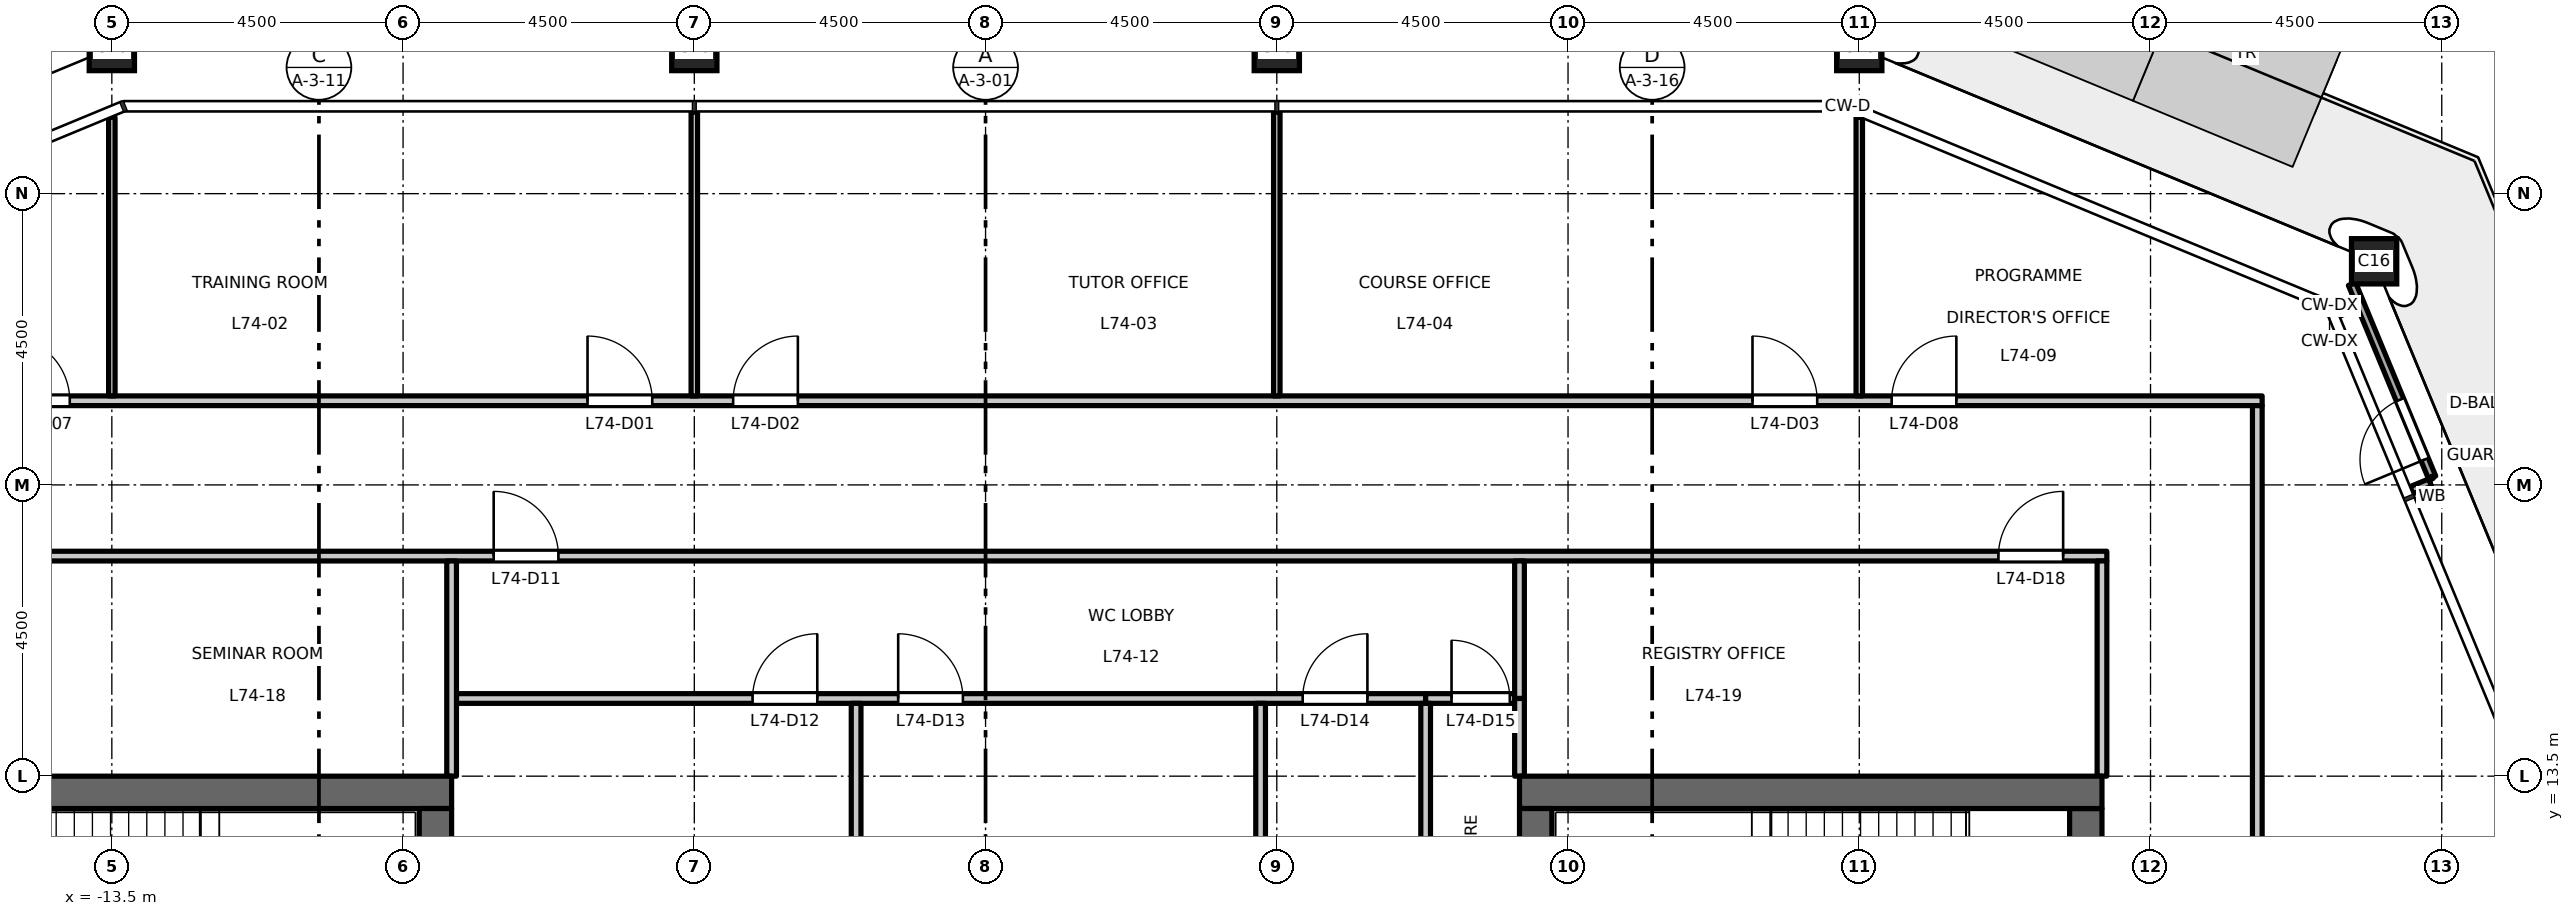
"""IFC4 building model, lengths in metres.
Left out: names, types, materials, properties, quantities, classifications, styles, units other than length and angle.
Written with IfcOpenShell. Run it as: python <this file> out.ifc"""

import sys

from ifc_helpers import new_model, si_unit, direction, frame, frame_2d, origin, origin_2d, place, context, subcontext, project, spatial, rectangle, hollow_rectangle, extrude, element, fill, save


model = new_model("IFC4")
c1 = context("Model", 3, precision=1e-05, world=origin(), true_north=direction((0.0, 1.0)))
c2 = subcontext(c1, "Body", "Model", "MODEL_VIEW")
j1 = project(units=[si_unit("LENGTHUNIT", "METRE"), si_unit("PLANEANGLEUNIT", "RADIAN")], contexts=[c1])
p1 = place(None, origin())
s1 = spatial("IfcSite", under=j1, at=p1, CompositionType="ELEMENT")
p2 = place(p1, origin())
s2 = spatial("IfcBuilding", under=s1, at=p2, CompositionType="ELEMENT")
p3 = place(p2, frame((0.0, 0.0, 343.7)))
s3 = spatial("IfcBuildingStorey", under=s2, at=p3, CompositionType="ELEMENT", Elevation=343.7)
for number, where, z_axis, x_axis in (
    (1, (21.455, 21.455, 0.0), (0.0, 0.0, 1.0), (1.0, 0.0, 0.0)),
    (2, (13.5, 24.75, 0.0), (0.0, 0.0, 1.0), (1.0, 0.0, 0.0)),
    (3, (4.5, 24.75, 0.0), (0.0, 0.0, 1.0), (1.0, 0.0, 0.0)),
    (4, (-4.5, 24.75, 0.0), (0.0, 0.0, 1.0), (1.0, 0.0, 0.0)),
    (5, (-13.5, 24.75, 0.0), (0.0, 0.0, 1.0), (1.0, 0.0, 0.0)),
):
    element("IfcColumn", number, at=place(p3, frame(where, z_axis=z_axis, x_axis=x_axis)), inside=s3, PredefinedType="COLUMN", context=c2, shape_type="SweptSolid", body=[
        extrude(hollow_rectangle(XDim=0.7, YDim=0.7, WallThickness=0.036, at=origin_2d()), origin(), (0.0, 0.0, 1.0), 4.5),
    ])
p4 = place(p3, frame((-8.25, 13.25, 0.0), z_axis=(0.0, 0.0, 1.0), x_axis=(-1.0, 0.0, 0.0)))
e6 = element("IfcWall", 6, at=p4, inside=s3, PredefinedType="SHEAR", context=c2, shape_type="SweptSolid", body=[
    extrude(rectangle(XDim=9.0, YDim=0.5, at=frame_2d((4.5, 0.0))), origin(), (0.0, 0.0, 1.0), 4.3),
])
p5 = place(p3, frame((-8.5, -13.0, 0.0), z_axis=(0.0, 0.0, 1.0), x_axis=(0.0, 1.0, 0.0)))
e7 = element("IfcWall", 7, at=p5, inside=s3, PredefinedType="SHEAR", context=c2, shape_type="SweptSolid", body=[
    extrude(rectangle(XDim=26.0, YDim=0.5, at=frame_2d((13.0, 0.0))), origin(), (0.0, 0.0, 1.0), 4.3),
])
p6 = place(p3, frame((17.0, -13.0, 0.0), z_axis=(0.0, 0.0, 1.0), x_axis=(0.0, 1.0, 0.0)))
e8 = element("IfcWall", 8, at=p6, inside=s3, PredefinedType="SHEAR", context=c2, shape_type="SweptSolid", body=[
    extrude(rectangle(XDim=26.0, YDim=0.5, at=frame_2d((13.0, 0.0))), origin(), (0.0, 0.0, 1.0), 4.3),
])
p7 = place(p6, frame((16.825, 0.0, 0.0)))
e9 = element("IfcOpeningElement", 9, at=p7, cuts=e8, PredefinedType="OPENING", context=c2, shape_type="SweptSolid", body=[
    extrude(rectangle(XDim=1.8, YDim=2.1, at=frame_2d((0.9, 1.05))), frame((0.0, 0.26, 0.0), z_axis=(0.0, -1.0, 0.0), x_axis=(1.0, 0.0, 0.0)), (0.0, 0.0, 1.0), 0.52),
])
p8 = place(p6, frame((7.375, 0.0, 0.0)))
e10 = element("IfcOpeningElement", 10, at=p8, cuts=e8, PredefinedType="OPENING", context=c2, shape_type="SweptSolid", body=[
    extrude(rectangle(XDim=1.8, YDim=2.1, at=frame_2d((0.9, 1.05))), frame((0.0, 0.26, 0.0), z_axis=(0.0, -1.0, 0.0), x_axis=(1.0, 0.0, 0.0)), (0.0, 0.0, 1.0), 0.52),
])
p9 = place(p3, frame((8.25, 13.25, 0.0), z_axis=(0.0, 0.0, 1.0), x_axis=(1.0, 0.0, 0.0)))
e11 = element("IfcWall", 11, at=p9, inside=s3, PredefinedType="SHEAR", context=c2, shape_type="SweptSolid", body=[
    extrude(rectangle(XDim=9.0, YDim=0.5, at=frame_2d((4.5, 0.0))), origin(), (0.0, 0.0, 1.0), 4.3),
])
p10 = place(p3, frame((8.5, -13.0, 0.0), z_axis=(0.0, 0.0, 1.0), x_axis=(0.0, 1.0, 0.0)))
e12 = element("IfcWall", 12, at=p10, inside=s3, PredefinedType="SHEAR", context=c2, shape_type="SweptSolid", body=[
    extrude(rectangle(XDim=26.0, YDim=0.5, at=frame_2d((13.0, 0.0))), origin(), (0.0, 0.0, 1.0), 4.3),
])
p11 = place(p3, frame((22.033, 17.917, 0.0), z_axis=(0.0, 0.0, 1.0), x_axis=(0.923844027884, 0.382769136873, 0.0)))
e13 = element("IfcWall", 13, at=p11, inside=s3, PredefinedType="STANDARD", context=c2, shape_type="SweptSolid", body=[
    extrude(rectangle(XDim=0.31, YDim=0.12, at=frame_2d((0.155, 0.0))), origin(), (0.0, 0.0, 1.0), 4.3),
])
p12 = place(p3, frame((20.896, 20.66, 0.0), z_axis=(0.0, 0.0, 1.0), x_axis=(0.923959293734, 0.382490814953, 0.0)))
e14 = element("IfcWall", 14, at=p12, inside=s3, PredefinedType="STANDARD", context=c2, shape_type="SweptSolid", body=[
    extrude(rectangle(XDim=0.31, YDim=0.12, at=frame_2d((0.155, 0.0))), origin(), (0.0, 0.0, 1.0), 4.3),
])
p13 = place(p3, frame((22.352, 18.115, 0.0), z_axis=(0.0, 0.0, 1.0), x_axis=(-0.382702621907, 0.923871583709, 0.0)))
e15 = element("IfcWall", 15, at=p13, inside=s3, PredefinedType="STANDARD", context=c2, shape_type="SweptSolid", body=[
    extrude(rectangle(XDim=3.237, YDim=0.12, at=frame_2d((1.618, 0.0))), origin(), (0.0, 0.0, 1.0), 4.3),
])
p14 = place(p13, frame((0.3, 0.0, 0.0)))
e16 = element("IfcOpeningElement", 16, at=p14, cuts=e15, PredefinedType="OPENING", context=c2, shape_type="SweptSolid", body=[
    extrude(rectangle(XDim=1.0, YDim=2.4, at=frame_2d((0.5, 1.2))), frame((0.0, 0.07, 0.0), z_axis=(0.0, -1.0, 0.0), x_axis=(1.0, 0.0, 0.0)), (0.0, 0.0, 1.0), 0.14),
])
p15 = place(p3, frame((-8.175, 14.7, 0.0), z_axis=(0.0, 0.0, 1.0), x_axis=(1.0, 0.0, 0.0)))
e17 = element("IfcWall", 17, at=p15, inside=s3, PredefinedType="PARTITIONING", context=c2, shape_type="SweptSolid", body=[
    extrude(rectangle(XDim=14.975, YDim=0.15, at=frame_2d((7.488, 0.0))), origin(), (0.0, 0.0, 1.0), 4.3),
])
p16 = place(p15, frame((4.575, 0.0, 0.0)))
e18 = element("IfcOpeningElement", 18, at=p16, cuts=e17, PredefinedType="OPENING", context=c2, shape_type="SweptSolid", body=[
    extrude(rectangle(XDim=1.0, YDim=2.1, at=frame_2d((0.5, 1.05))), frame((0.0, 0.085, 0.0), z_axis=(0.0, -1.0, 0.0), x_axis=(1.0, 0.0, 0.0)), (0.0, 0.0, 1.0), 0.17),
])
p17 = place(p15, frame((6.825, 0.0, 0.0)))
e19 = element("IfcOpeningElement", 19, at=p17, cuts=e17, PredefinedType="OPENING", context=c2, shape_type="SweptSolid", body=[
    extrude(rectangle(XDim=1.0, YDim=2.1, at=frame_2d((0.5, 1.05))), frame((0.0, 0.085, 0.0), z_axis=(0.0, -1.0, 0.0), x_axis=(1.0, 0.0, 0.0)), (0.0, 0.0, 1.0), 0.17),
])
p18 = place(p15, frame((13.075, 0.0, 0.0)))
e20 = element("IfcOpeningElement", 20, at=p18, cuts=e17, PredefinedType="OPENING", context=c2, shape_type="SweptSolid", body=[
    extrude(rectangle(XDim=1.0, YDim=2.1, at=frame_2d((0.5, 1.05))), frame((0.0, 0.085, 0.0), z_axis=(0.0, -1.0, 0.0), x_axis=(1.0, 0.0, 0.0)), (0.0, 0.0, 1.0), 0.17),
])
p19 = place(p3, frame((6.8, 14.7, 0.0), z_axis=(0.0, 0.0, 1.0), x_axis=(1.0, 0.0, 0.0)))
e21 = element("IfcWall", 21, at=p19, inside=s3, PredefinedType="PARTITIONING", context=c2, shape_type="SweptSolid", body=[
    extrude(rectangle(XDim=1.375, YDim=0.15, at=frame_2d((0.688, 0.0))), origin(), (0.0, 0.0, 1.0), 4.3),
])
p20 = place(p19, frame((0.4, 0.0, 0.0)))
e22 = element("IfcOpeningElement", 22, at=p20, cuts=e21, PredefinedType="OPENING", context=c2, shape_type="SweptSolid", body=[
    extrude(rectangle(XDim=0.9, YDim=2.1, at=frame_2d((0.45, 1.05))), frame((0.0, 0.085, 0.0), z_axis=(0.0, -1.0, 0.0), x_axis=(1.0, 0.0, 0.0)), (0.0, 0.0, 1.0), 0.17),
])
p21 = place(p3, frame((-17.325, 16.9, 0.0), z_axis=(0.0, 0.0, 1.0), x_axis=(1.0, 0.0, 0.0)))
e23 = element("IfcWall", 23, at=p21, inside=s3, PredefinedType="PARTITIONING", context=c2, shape_type="SweptSolid", body=[
    extrude(rectangle(XDim=34.65, YDim=0.15, at=frame_2d((17.325, 0.0))), origin(), (0.0, 0.0, 1.0), 4.3),
])
p22 = place(p21, frame((9.725, 0.0, 0.0)))
e24 = element("IfcOpeningElement", 24, at=p22, cuts=e23, PredefinedType="OPENING", context=c2, shape_type="SweptSolid", body=[
    extrude(rectangle(XDim=1.0, YDim=2.1, at=frame_2d((0.5, 1.05))), frame((0.0, 0.085, 0.0), z_axis=(0.0, -1.0, 0.0), x_axis=(1.0, 0.0, 0.0)), (0.0, 0.0, 1.0), 0.17),
])
p23 = place(p21, frame((0.725, 0.0, 0.0)))
e25 = element("IfcOpeningElement", 25, at=p23, cuts=e23, PredefinedType="OPENING", context=c2, shape_type="SweptSolid", body=[
    extrude(rectangle(XDim=1.0, YDim=2.1, at=frame_2d((0.5, 1.05))), frame((0.0, 0.085, 0.0), z_axis=(0.0, -1.0, 0.0), x_axis=(1.0, 0.0, 0.0)), (0.0, 0.0, 1.0), 0.17),
])
p24 = place(p21, frame((32.975, 0.0, 0.0)))
e26 = element("IfcOpeningElement", 26, at=p24, cuts=e23, PredefinedType="OPENING", context=c2, shape_type="SweptSolid", body=[
    extrude(rectangle(XDim=1.0, YDim=2.1, at=frame_2d((0.5, 1.05))), frame((0.0, 0.085, 0.0), z_axis=(0.0, -1.0, 0.0), x_axis=(1.0, 0.0, 0.0)), (0.0, 0.0, 1.0), 0.17),
])
p25 = place(p3, frame((-21.276, 19.3, 0.0), z_axis=(0.0, 0.0, 1.0), x_axis=(1.0, 0.0, 0.0)))
e27 = element("IfcWall", 27, at=p25, inside=s3, PredefinedType="PARTITIONING", context=c2, shape_type="SweptSolid", body=[
    extrude(rectangle(XDim=41.001, YDim=0.15, at=frame_2d((20.5, 0.0))), origin(), (0.0, 0.0, 1.0), 4.3),
])
p26 = place(p25, frame((15.126, 0.0, 0.0)))
e28 = element("IfcOpeningElement", 28, at=p26, cuts=e27, PredefinedType="OPENING", context=c2, shape_type="SweptSolid", body=[
    extrude(rectangle(XDim=1.0, YDim=2.1, at=frame_2d((0.5, 1.05))), frame((0.0, 0.085, 0.0), z_axis=(0.0, -1.0, 0.0), x_axis=(1.0, 0.0, 0.0)), (0.0, 0.0, 1.0), 0.17),
])
p27 = place(p25, frame((17.376, 0.0, 0.0)))
e29 = element("IfcOpeningElement", 29, at=p27, cuts=e27, PredefinedType="OPENING", context=c2, shape_type="SweptSolid", body=[
    extrude(rectangle(XDim=1.0, YDim=2.1, at=frame_2d((0.5, 1.05))), frame((0.0, 0.085, 0.0), z_axis=(0.0, -1.0, 0.0), x_axis=(1.0, 0.0, 0.0)), (0.0, 0.0, 1.0), 0.17),
])
p28 = place(p25, frame((33.126, 0.0, 0.0)))
e30 = element("IfcOpeningElement", 30, at=p28, cuts=e27, PredefinedType="OPENING", context=c2, shape_type="SweptSolid", body=[
    extrude(rectangle(XDim=1.0, YDim=2.1, at=frame_2d((0.5, 1.05))), frame((0.0, 0.085, 0.0), z_axis=(0.0, -1.0, 0.0), x_axis=(1.0, 0.0, 0.0)), (0.0, 0.0, 1.0), 0.17),
])
p29 = place(p25, frame((6.126, 0.0, 0.0)))
e31 = element("IfcOpeningElement", 31, at=p29, cuts=e27, PredefinedType="OPENING", context=c2, shape_type="SweptSolid", body=[
    extrude(rectangle(XDim=1.0, YDim=2.1, at=frame_2d((0.5, 1.05))), frame((0.0, 0.085, 0.0), z_axis=(0.0, -1.0, 0.0), x_axis=(1.0, 0.0, 0.0)), (0.0, 0.0, 1.0), 0.17),
])
p30 = place(p25, frame((35.276, 0.0, 0.0)))
e32 = element("IfcOpeningElement", 32, at=p30, cuts=e27, PredefinedType="OPENING", context=c2, shape_type="SweptSolid", body=[
    extrude(rectangle(XDim=1.0, YDim=2.1, at=frame_2d((0.5, 1.05))), frame((0.0, 0.085, 0.0), z_axis=(0.0, -1.0, 0.0), x_axis=(1.0, 0.0, 0.0)), (0.0, 0.0, 1.0), 0.17),
])
p31 = place(p3, frame((-13.5, 19.375, 0.0), z_axis=(0.0, 0.0, 1.0), x_axis=(0.0, 1.0, 0.0)))
e33 = element("IfcWall", 33, at=p31, inside=s3, PredefinedType="PARTITIONING", context=c2, shape_type="SweptSolid", body=[
    extrude(rectangle(XDim=4.303, YDim=0.1, at=frame_2d((2.151, 0.0))), origin(), (0.0, 0.0, 1.0), 3.7),
])
p32 = place(p3, frame((-8.25, 13.5, 0.0), z_axis=(0.0, 0.0, 1.0), x_axis=(0.0, 1.0, 0.0)))
e34 = element("IfcWall", 34, at=p32, inside=s3, PredefinedType="PARTITIONING", context=c2, shape_type="SweptSolid", body=[
    extrude(rectangle(XDim=3.325, YDim=0.15, at=frame_2d((1.663, 0.0))), origin(), (0.0, 0.0, 1.0), 4.3),
])
p33 = place(p3, frame((-4.5, 19.375, 0.0), z_axis=(0.0, 0.0, 1.0), x_axis=(0.0, 1.0, 0.0)))
e35 = element("IfcWall", 35, at=p33, inside=s3, PredefinedType="PARTITIONING", context=c2, shape_type="SweptSolid", body=[
    extrude(rectangle(XDim=4.385, YDim=0.1, at=frame_2d((2.192, 0.0))), origin(), (0.0, 0.0, 1.0), 3.6),
])
for number, where, z_axis, x_axis in (
    (36, (-2.0, 8.37, 0.0), (0.0, 0.0, 1.0), (0.0, 1.0, 0.0)),
    (37, (4.25, 8.37, 0.0), (0.0, 0.0, 1.0), (0.0, 1.0, 0.0)),
):
    element("IfcWall", number, at=place(p3, frame(where, z_axis=z_axis, x_axis=x_axis)), inside=s3, PredefinedType="PARTITIONING", context=c2, shape_type="SweptSolid", body=[
        extrude(rectangle(XDim=6.255, YDim=0.15, at=frame_2d((3.127, 0.0))), origin(), (0.0, 0.0, 1.0), 4.3),
    ])
p34 = place(p3, frame((4.5, 19.375, 0.0), z_axis=(0.0, 0.0, 1.0), x_axis=(0.0, 1.0, 0.0)))
e38 = element("IfcWall", 38, at=p34, inside=s3, PredefinedType="PARTITIONING", context=c2, shape_type="SweptSolid", body=[
    extrude(rectangle(XDim=4.385, YDim=0.1, at=frame_2d((2.192, 0.0))), origin(), (0.0, 0.0, 1.0), 3.6),
])
p35 = place(p3, frame((6.8, 8.069, 0.0), z_axis=(0.0, 0.0, 1.0), x_axis=(0.0, 1.0, 0.0)))
e39 = element("IfcWall", 39, at=p35, inside=s3, PredefinedType="PARTITIONING", context=c2, shape_type="SweptSolid", body=[
    extrude(rectangle(XDim=6.556, YDim=0.15, at=frame_2d((3.278, 0.0))), origin(), (0.0, 0.0, 1.0), 4.3),
])
p36 = place(p3, frame((8.25, 14.7, 0.0), z_axis=(0.0, 0.0, 1.0), x_axis=(0.0, 1.0, 0.0)))
e40 = element("IfcWall", 40, at=p36, inside=s3, PredefinedType="PARTITIONING", context=c2, shape_type="SweptSolid", body=[
    extrude(rectangle(XDim=2.125, YDim=0.15, at=frame_2d((1.062, 0.0))), origin(), (0.0, 0.0, 1.0), 4.3),
])
p37 = place(p3, frame((8.25, 13.5, 0.0), z_axis=(0.0, 0.0, 1.0), x_axis=(0.0, 1.0, 0.0)))
e41 = element("IfcWall", 41, at=p37, inside=s3, PredefinedType="PARTITIONING", context=c2, shape_type="SweptSolid", body=[
    extrude(rectangle(XDim=1.2, YDim=0.15, at=frame_2d((0.6, 0.0))), origin(), (0.0, 0.0, 1.0), 4.3),
])
p38 = place(p3, frame((13.5, 19.375, 0.0), z_axis=(0.0, 0.0, 1.0), x_axis=(0.0, 1.0, 0.0)))
e42 = element("IfcWall", 42, at=p38, inside=s3, PredefinedType="PARTITIONING", context=c2, shape_type="SweptSolid", body=[
    extrude(rectangle(XDim=4.303, YDim=0.1, at=frame_2d((2.151, 0.0))), origin(), (0.0, 0.0, 1.0), 3.7),
])
p39 = place(p3, frame((17.25, 13.5, 0.0), z_axis=(0.0, 0.0, 1.0), x_axis=(0.0, 1.0, 0.0)))
e43 = element("IfcWall", 43, at=p39, inside=s3, PredefinedType="PARTITIONING", context=c2, shape_type="SweptSolid", body=[
    extrude(rectangle(XDim=3.325, YDim=0.15, at=frame_2d((1.663, 0.0))), origin(), (0.0, 0.0, 1.0), 4.3),
])
p40 = place(p3, frame((19.65, -16.825, 0.0), z_axis=(0.0, 0.0, 1.0), x_axis=(0.0, 1.0, 0.0)))
e44 = element("IfcWall", 44, at=p40, inside=s3, PredefinedType="PARTITIONING", context=c2, shape_type="SweptSolid", body=[
    extrude(rectangle(XDim=36.05, YDim=0.15, at=frame_2d((18.025, 0.0))), origin(), (0.0, 0.0, 1.0), 4.3),
])
p41 = place(p40, frame((0.575, 0.0, 0.0)))
e45 = element("IfcOpeningElement", 45, at=p41, cuts=e44, PredefinedType="OPENING", context=c2, shape_type="SweptSolid", body=[
    extrude(rectangle(XDim=1.0, YDim=2.1, at=frame_2d((0.5, 1.05))), frame((0.0, 0.085, 0.0), z_axis=(0.0, -1.0, 0.0), x_axis=(1.0, 0.0, 0.0)), (0.0, 0.0, 1.0), 0.17),
])
p42 = place(p14, origin())
e46 = element("IfcDoor", 46, at=p42, inside=s3, OperationType="SINGLE_SWING_LEFT", PredefinedType="DOOR", context=c2, shape_type="SweptSolid", body=[
    extrude(rectangle(XDim=1.0, YDim=2.4, at=frame_2d((0.5, 1.2))), frame((0.0, 0.025, 0.0), z_axis=(0.0, -1.0, 0.0), x_axis=(1.0, 0.0, 0.0)), (0.0, 0.0, 1.0), 0.05),
])
fill(e16, e46)
p43 = place(p26, origin())
e47 = element("IfcDoor", 47, at=p43, inside=s3, OperationType="SINGLE_SWING_LEFT", PredefinedType="DOOR", context=c2, shape_type="SweptSolid", body=[
    extrude(rectangle(XDim=1.0, YDim=2.1, at=frame_2d((0.5, 1.05))), frame((0.0, 0.025, 0.0), z_axis=(0.0, -1.0, 0.0), x_axis=(1.0, 0.0, 0.0)), (0.0, 0.0, 1.0), 0.05),
])
fill(e28, e47)
p44 = place(p27, origin())
e48 = element("IfcDoor", 48, at=p44, inside=s3, OperationType="SINGLE_SWING_RIGHT", PredefinedType="DOOR", context=c2, shape_type="SweptSolid", body=[
    extrude(rectangle(XDim=1.0, YDim=2.1, at=frame_2d((0.5, 1.05))), frame((0.0, 0.025, 0.0), z_axis=(0.0, -1.0, 0.0), x_axis=(1.0, 0.0, 0.0)), (0.0, 0.0, 1.0), 0.05),
])
fill(e29, e48)
p45 = place(p28, origin())
e49 = element("IfcDoor", 49, at=p45, inside=s3, OperationType="SINGLE_SWING_LEFT", PredefinedType="DOOR", context=c2, shape_type="SweptSolid", body=[
    extrude(rectangle(XDim=1.0, YDim=2.1, at=frame_2d((0.5, 1.05))), frame((0.0, 0.025, 0.0), z_axis=(0.0, -1.0, 0.0), x_axis=(1.0, 0.0, 0.0)), (0.0, 0.0, 1.0), 0.05),
])
fill(e30, e49)
p46 = place(p29, origin())
e50 = element("IfcDoor", 50, at=p46, inside=s3, OperationType="SINGLE_SWING_LEFT", PredefinedType="DOOR", context=c2, shape_type="SweptSolid", body=[
    extrude(rectangle(XDim=1.0, YDim=2.1, at=frame_2d((0.5, 1.05))), frame((0.0, 0.025, 0.0), z_axis=(0.0, -1.0, 0.0), x_axis=(1.0, 0.0, 0.0)), (0.0, 0.0, 1.0), 0.05),
])
fill(e31, e50)
p47 = place(p30, origin())
e51 = element("IfcDoor", 51, at=p47, inside=s3, OperationType="SINGLE_SWING_RIGHT", PredefinedType="DOOR", context=c2, shape_type="SweptSolid", body=[
    extrude(rectangle(XDim=1.0, YDim=2.1, at=frame_2d((0.5, 1.05))), frame((0.0, 0.025, 0.0), z_axis=(0.0, -1.0, 0.0), x_axis=(1.0, 0.0, 0.0)), (0.0, 0.0, 1.0), 0.05),
])
fill(e32, e51)
p48 = place(p22, origin())
e52 = element("IfcDoor", 52, at=p48, inside=s3, OperationType="SINGLE_SWING_LEFT", PredefinedType="DOOR", context=c2, shape_type="SweptSolid", body=[
    extrude(rectangle(XDim=1.0, YDim=2.1, at=frame_2d((0.5, 1.05))), frame((0.0, 0.025, 0.0), z_axis=(0.0, -1.0, 0.0), x_axis=(1.0, 0.0, 0.0)), (0.0, 0.0, 1.0), 0.05),
])
fill(e24, e52)
p49 = place(p16, origin())
e53 = element("IfcDoor", 53, at=p49, inside=s3, OperationType="SINGLE_SWING_RIGHT", PredefinedType="DOOR", context=c2, shape_type="SweptSolid", body=[
    extrude(rectangle(XDim=1.0, YDim=2.1, at=frame_2d((0.5, 1.05))), frame((0.0, 0.025, 0.0), z_axis=(0.0, -1.0, 0.0), x_axis=(1.0, 0.0, 0.0)), (0.0, 0.0, 1.0), 0.05),
])
fill(e18, e53)
p50 = place(p17, origin())
e54 = element("IfcDoor", 54, at=p50, inside=s3, OperationType="SINGLE_SWING_LEFT", PredefinedType="DOOR", context=c2, shape_type="SweptSolid", body=[
    extrude(rectangle(XDim=1.0, YDim=2.1, at=frame_2d((0.5, 1.05))), frame((0.0, 0.025, 0.0), z_axis=(0.0, -1.0, 0.0), x_axis=(1.0, 0.0, 0.0)), (0.0, 0.0, 1.0), 0.05),
])
fill(e19, e54)
p51 = place(p18, origin())
e55 = element("IfcDoor", 55, at=p51, inside=s3, OperationType="SINGLE_SWING_RIGHT", PredefinedType="DOOR", context=c2, shape_type="SweptSolid", body=[
    extrude(rectangle(XDim=1.0, YDim=2.1, at=frame_2d((0.5, 1.05))), frame((0.0, 0.025, 0.0), z_axis=(0.0, -1.0, 0.0), x_axis=(1.0, 0.0, 0.0)), (0.0, 0.0, 1.0), 0.05),
])
fill(e20, e55)
p52 = place(p20, origin())
e56 = element("IfcDoor", 56, at=p52, inside=s3, OperationType="SINGLE_SWING_LEFT", PredefinedType="DOOR", context=c2, shape_type="SweptSolid", body=[
    extrude(rectangle(XDim=0.9, YDim=2.1, at=frame_2d((0.45, 1.05))), frame((0.0, 0.025, 0.0), z_axis=(0.0, -1.0, 0.0), x_axis=(1.0, 0.0, 0.0)), (0.0, 0.0, 1.0), 0.05),
])
fill(e22, e56)
p53 = place(p24, origin())
e57 = element("IfcDoor", 57, at=p53, inside=s3, OperationType="SINGLE_SWING_RIGHT", PredefinedType="DOOR", context=c2, shape_type="SweptSolid", body=[
    extrude(rectangle(XDim=1.0, YDim=2.1, at=frame_2d((0.5, 1.05))), frame((0.0, 0.025, 0.0), z_axis=(0.0, -1.0, 0.0), x_axis=(1.0, 0.0, 0.0)), (0.0, 0.0, 1.0), 0.05),
])
fill(e26, e57)
save(model, sys.argv[1])
